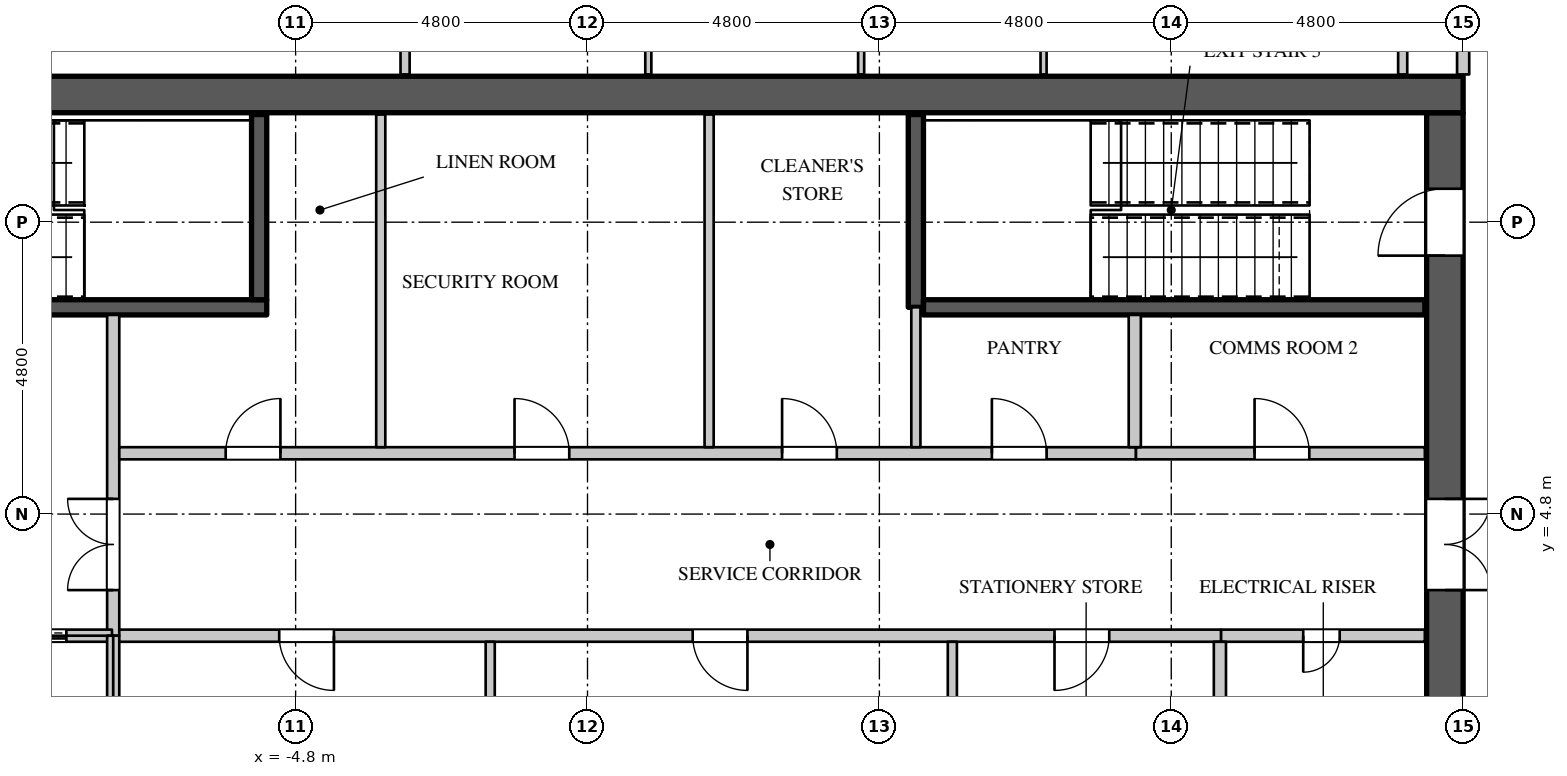
"""IFC4 building model, lengths in metres.
Left out: names, types, materials, properties, quantities, classifications, styles, units other than length and angle.
Written with IfcOpenShell. Run it as: python <this file> out.ifc"""

import sys

from ifc_helpers import new_model, si_unit, direction, frame, frame_2d, origin, place, context, subcontext, project, spatial, rectangle, extrude, element, fill, save


model = new_model("IFC4")
c1 = context("Model", 3, precision=1e-05, world=origin(), true_north=direction((0.0, 1.0)))
c2 = subcontext(c1, "Body", "Model", "MODEL_VIEW")
j1 = project(units=[si_unit("LENGTHUNIT", "METRE"), si_unit("PLANEANGLEUNIT", "RADIAN")], contexts=[c1])
p1 = place(None, origin())
s1 = spatial("IfcSite", under=j1, at=p1, CompositionType="ELEMENT")
p2 = place(p1, origin())
s2 = spatial("IfcBuilding", under=s1, at=p2, CompositionType="ELEMENT")
p3 = place(p2, frame((0.0, 0.0, 293.7)))
s3 = spatial("IfcBuildingStorey", under=s2, at=p3, CompositionType="ELEMENT", Elevation=293.7)
p4 = place(p3, frame((-14.4, 11.7, 0.0), z_axis=(0.0, 0.0, 1.0), x_axis=(1.0, 0.0, 0.0)))
e1 = element("IfcWall", 1, at=p4, inside=s3, PredefinedType="SHEAR", context=c2, shape_type="SweptSolid", body=[
    extrude(rectangle(XDim=28.8, YDim=0.6, at=frame_2d((14.4, 0.0))), origin(), (0.0, 0.0, 1.0), 4.2),
])
p5 = place(p3, frame((14.1, -11.4, 0.0), z_axis=(0.0, 0.0, 1.0), x_axis=(0.0, 1.0, 0.0)))
e2 = element("IfcWall", 2, at=p5, inside=s3, PredefinedType="SHEAR", context=c2, shape_type="SweptSolid", body=[
    extrude(rectangle(XDim=22.8, YDim=0.6, at=frame_2d((11.4, 0.0))), origin(), (0.0, 0.0, 1.0), 4.2),
])
p6 = place(p5, frame((20.45, 0.0, 0.0)))
e3 = element("IfcOpeningElement", 3, at=p6, cuts=e2, PredefinedType="OPENING", context=c2, shape_type="SweptSolid", body=[
    extrude(rectangle(XDim=1.1, YDim=2.2, at=frame_2d((0.55, 1.1))), frame((0.0, 0.31, 0.0), z_axis=(0.0, -1.0, 0.0), x_axis=(1.0, 0.0, 0.0)), (0.0, 0.0, 1.0), 0.62),
])
p7 = place(p5, frame((1.25, 0.0, 0.0)))
e4 = element("IfcOpeningElement", 4, at=p7, cuts=e2, PredefinedType="OPENING", context=c2, shape_type="SweptSolid", body=[
    extrude(rectangle(XDim=1.1, YDim=2.2, at=frame_2d((0.55, 1.1))), frame((0.0, 0.31, 0.0), z_axis=(0.0, -1.0, 0.0), x_axis=(1.0, 0.0, 0.0)), (0.0, 0.0, 1.0), 0.62),
])
p8 = place(p5, frame((14.95, 0.0, 0.0)))
e5 = element("IfcOpeningElement", 5, at=p8, cuts=e2, PredefinedType="OPENING", context=c2, shape_type="SweptSolid", body=[
    extrude(rectangle(XDim=1.5, YDim=2.4, at=frame_2d((0.75, 1.2))), frame((0.0, 0.31, 0.0), z_axis=(0.0, -1.0, 0.0), x_axis=(1.0, 0.0, 0.0)), (0.0, 0.0, 1.0), 0.62),
])
p9 = place(p5, frame((6.35, 0.0, 0.0)))
e6 = element("IfcOpeningElement", 6, at=p9, cuts=e2, PredefinedType="OPENING", context=c2, shape_type="SweptSolid", body=[
    extrude(rectangle(XDim=1.5, YDim=2.4, at=frame_2d((0.75, 1.2))), frame((0.0, 0.31, 0.0), z_axis=(0.0, -1.0, 0.0), x_axis=(1.0, 0.0, 0.0)), (0.0, 0.0, 1.0), 0.62),
])
p10 = place(p3, frame((-7.82, 2.8, 0.0), z_axis=(0.0, 0.0, 1.0), x_axis=(1.0, 0.0, 0.0)))
e7 = element("IfcWall", 7, at=p10, inside=s3, PredefinedType="PARTITIONING", context=c2, shape_type="SweptSolid", body=[
    extrude(rectangle(XDim=18.24, YDim=0.2, at=frame_2d((9.12, 0.0))), origin(), (0.0, 0.0, 1.0), 3.95),
])
p11 = place(p10, frame((2.75, 0.0, 0.0)))
e8 = element("IfcOpeningElement", 8, at=p11, cuts=e7, PredefinedType="OPENING", context=c2, shape_type="SweptSolid", body=[
    extrude(rectangle(XDim=0.9, YDim=2.2, at=frame_2d((0.45, 1.1))), frame((0.0, 0.11, 0.0), z_axis=(0.0, -1.0, 0.0), x_axis=(1.0, 0.0, 0.0)), (0.0, 0.0, 1.0), 0.22),
])
p12 = place(p10, frame((9.55, 0.0, 0.0)))
e9 = element("IfcOpeningElement", 9, at=p12, cuts=e7, PredefinedType="OPENING", context=c2, shape_type="SweptSolid", body=[
    extrude(rectangle(XDim=0.9, YDim=2.2, at=frame_2d((0.45, 1.1))), frame((0.0, 0.11, 0.0), z_axis=(0.0, -1.0, 0.0), x_axis=(1.0, 0.0, 0.0)), (0.0, 0.0, 1.0), 0.22),
])
p13 = place(p10, frame((15.5, 0.0, 0.0)))
e10 = element("IfcOpeningElement", 10, at=p13, cuts=e7, PredefinedType="OPENING", context=c2, shape_type="SweptSolid", body=[
    extrude(rectangle(XDim=0.9, YDim=2.2, at=frame_2d((0.45, 1.1))), frame((0.0, 0.11, 0.0), z_axis=(0.0, -1.0, 0.0), x_axis=(1.0, 0.0, 0.0)), (0.0, 0.0, 1.0), 0.22),
])
p14 = place(p3, frame((-7.8, 2.8, 0.0), z_axis=(0.0, 0.0, 1.0), x_axis=(0.0, 1.0, 0.0)))
e11 = element("IfcWall", 11, at=p14, inside=s3, PredefinedType="PARTITIONING", context=c2, shape_type="SweptSolid", body=[
    extrude(rectangle(XDim=5.275, YDim=0.2, at=frame_2d((2.637, 0.0))), origin(), (0.0, 0.0, 1.0), 3.95),
])
p15 = place(p14, frame((0.75, 0.0, 0.0)))
e12 = element("IfcOpeningElement", 12, at=p15, cuts=e11, PredefinedType="OPENING", context=c2, shape_type="SweptSolid", body=[
    extrude(rectangle(XDim=1.5, YDim=2.4, at=frame_2d((0.75, 1.2))), frame((0.0, 0.11, 0.0), z_axis=(0.0, -1.0, 0.0), x_axis=(1.0, 0.0, 0.0)), (0.0, 0.0, 1.0), 0.22),
])
p16 = place(p3, frame((-7.7, 5.8, 0.0), z_axis=(0.0, 0.0, 1.0), x_axis=(1.0, 0.0, 0.0)))
e13 = element("IfcWall", 13, at=p16, inside=s3, PredefinedType="PARTITIONING", context=c2, shape_type="SweptSolid", body=[
    extrude(rectangle(XDim=16.72, YDim=0.2, at=frame_2d((8.36, 0.0))), origin(), (0.0, 0.0, 1.0), 3.95),
])
p17 = place(p16, frame((1.75, 0.0, 0.0)))
e14 = element("IfcOpeningElement", 14, at=p17, cuts=e13, PredefinedType="OPENING", context=c2, shape_type="SweptSolid", body=[
    extrude(rectangle(XDim=0.9, YDim=2.2, at=frame_2d((0.45, 1.1))), frame((0.0, 0.11, 0.0), z_axis=(0.0, -1.0, 0.0), x_axis=(1.0, 0.0, 0.0)), (0.0, 0.0, 1.0), 0.22),
])
p18 = place(p16, frame((6.5, 0.0, 0.0)))
e15 = element("IfcOpeningElement", 15, at=p18, cuts=e13, PredefinedType="OPENING", context=c2, shape_type="SweptSolid", body=[
    extrude(rectangle(XDim=0.9, YDim=2.2, at=frame_2d((0.45, 1.1))), frame((0.0, 0.11, 0.0), z_axis=(0.0, -1.0, 0.0), x_axis=(1.0, 0.0, 0.0)), (0.0, 0.0, 1.0), 0.22),
])
p19 = place(p16, frame((10.9, 0.0, 0.0)))
e16 = element("IfcOpeningElement", 16, at=p19, cuts=e13, PredefinedType="OPENING", context=c2, shape_type="SweptSolid", body=[
    extrude(rectangle(XDim=0.9, YDim=2.2, at=frame_2d((0.45, 1.1))), frame((0.0, 0.11, 0.0), z_axis=(0.0, -1.0, 0.0), x_axis=(1.0, 0.0, 0.0)), (0.0, 0.0, 1.0), 0.22),
])
p20 = place(p16, frame((14.35, 0.0, 0.0)))
e17 = element("IfcOpeningElement", 17, at=p20, cuts=e13, PredefinedType="OPENING", context=c2, shape_type="SweptSolid", body=[
    extrude(rectangle(XDim=0.9, YDim=2.2, at=frame_2d((0.45, 1.1))), frame((0.0, 0.11, 0.0), z_axis=(0.0, -1.0, 0.0), x_axis=(1.0, 0.0, 0.0)), (0.0, 0.0, 1.0), 0.22),
])
p21 = place(p3, frame((14.4, 12.03, 0.0), z_axis=(0.0, 0.0, 1.0), x_axis=(0.0, 1.0, 0.0)))
e18 = element("IfcWall", 18, at=p21, inside=s3, PredefinedType="PARTITIONING", context=c2, shape_type="SweptSolid", body=[
    extrude(rectangle(XDim=2.27, YDim=0.2, at=frame_2d((1.135, 0.0))), origin(), (0.0, 0.0, 1.0), 3.95),
])
p22 = place(p3, frame((-3.4, 5.9, 0.0), z_axis=(0.0, 0.0, 1.0), x_axis=(0.0, 1.0, 0.0)))
e19 = element("IfcWall", 19, at=p22, inside=s3, PredefinedType="PARTITIONING", context=c2, shape_type="SweptSolid", body=[
    extrude(rectangle(XDim=5.47, YDim=0.15, at=frame_2d((2.735, 0.0))), origin(), (0.0, 0.0, 1.0), 3.95),
])
p23 = place(p3, frame((-3.0, 12.03, 0.0), z_axis=(0.0, 0.0, 1.0), x_axis=(0.0, 1.0, 0.0)))
e20 = element("IfcWall", 20, at=p23, inside=s3, PredefinedType="PARTITIONING", context=c2, shape_type="SweptSolid", body=[
    extrude(rectangle(XDim=6.795, YDim=0.15, at=frame_2d((3.397, 0.0))), origin(), (0.0, 0.0, 1.0), 3.95),
])
p24 = place(p23, frame((2.95, 0.0, 0.0)))
e21 = element("IfcOpeningElement", 21, at=p24, cuts=e20, PredefinedType="OPENING", context=c2, shape_type="SweptSolid", body=[
    extrude(rectangle(XDim=0.9, YDim=2.2, at=frame_2d((0.45, 1.1))), frame((0.0, 0.085, 0.0), z_axis=(0.0, -1.0, 0.0), x_axis=(1.0, 0.0, 0.0)), (0.0, 0.0, 1.0), 0.17),
])
p25 = place(p3, frame((-1.6, 0.1, 0.0), z_axis=(0.0, 0.0, 1.0), x_axis=(0.0, 1.0, 0.0)))
e22 = element("IfcWall", 22, at=p25, inside=s3, PredefinedType="PARTITIONING", context=c2, shape_type="SweptSolid", body=[
    extrude(rectangle(XDim=2.6, YDim=0.15, at=frame_2d((1.3, 0.0))), origin(), (0.0, 0.0, 1.0), 3.95),
])
p26 = place(p3, frame((2.0, 5.9, 0.0), z_axis=(0.0, 0.0, 1.0), x_axis=(0.0, 1.0, 0.0)))
e23 = element("IfcWall", 23, at=p26, inside=s3, PredefinedType="PARTITIONING", context=c2, shape_type="SweptSolid", body=[
    extrude(rectangle(XDim=5.47, YDim=0.15, at=frame_2d((2.735, 0.0))), origin(), (0.0, 0.0, 1.0), 3.95),
])
p27 = place(p3, frame((5.4, 5.9, 0.0), z_axis=(0.0, 0.0, 1.0), x_axis=(0.0, 1.0, 0.0)))
e24 = element("IfcWall", 24, at=p27, inside=s3, PredefinedType="PARTITIONING", context=c2, shape_type="SweptSolid", body=[
    extrude(rectangle(XDim=2.3, YDim=0.15, at=frame_2d((1.15, 0.0))), origin(), (0.0, 0.0, 1.0), 3.95),
])
p28 = place(p3, frame((6.0, 0.1, 0.0), z_axis=(0.0, 0.0, 1.0), x_axis=(0.0, 1.0, 0.0)))
e25 = element("IfcWall", 25, at=p28, inside=s3, PredefinedType="PARTITIONING", context=c2, shape_type="SweptSolid", body=[
    extrude(rectangle(XDim=2.6, YDim=0.15, at=frame_2d((1.3, 0.0))), origin(), (0.0, 0.0, 1.0), 3.95),
])
p29 = place(p3, frame((13.406, 12.03, 0.0), z_axis=(0.0, 0.0, 1.0), x_axis=(0.0, 1.0, 0.0)))
e26 = element("IfcWall", 26, at=p29, inside=s3, PredefinedType="PARTITIONING", context=c2, shape_type="SweptSolid", body=[
    extrude(rectangle(XDim=13.701, YDim=0.15, at=frame_2d((6.851, 0.0))), origin(), (0.0, 0.0, 1.0), 3.3),
])
p30 = place(p29, frame((2.5, 0.0, 0.0)))
e27 = element("IfcOpeningElement", 27, at=p30, cuts=e26, PredefinedType="OPENING", context=c2, shape_type="SweptSolid", body=[
    extrude(rectangle(XDim=1.5, YDim=2.2, at=frame_2d((0.75, 1.1))), frame((0.0, 0.085, 0.0), z_axis=(0.0, -1.0, 0.0), x_axis=(1.0, 0.0, 0.0)), (0.0, 0.0, 1.0), 0.17),
])
p31 = place(p3, frame((9.02, 5.8, 0.0), z_axis=(0.0, 0.0, 1.0), x_axis=(1.0, 0.0, 0.0)))
e28 = element("IfcWall", 28, at=p31, inside=s3, PredefinedType="PARTITIONING", context=c2, shape_type="SweptSolid", body=[
    extrude(rectangle(XDim=4.75, YDim=0.2, at=frame_2d((2.375, 0.0))), origin(), (0.0, 0.0, 1.0), 3.95),
])
p32 = place(p31, frame((1.95, 0.0, 0.0)))
e29 = element("IfcOpeningElement", 29, at=p32, cuts=e28, PredefinedType="OPENING", context=c2, shape_type="SweptSolid", body=[
    extrude(rectangle(XDim=0.9, YDim=2.2, at=frame_2d((0.45, 1.1))), frame((0.0, 0.11, 0.0), z_axis=(0.0, -1.0, 0.0), x_axis=(1.0, 0.0, 0.0)), (0.0, 0.0, 1.0), 0.22),
])
p33 = place(p3, frame((9.0, 5.9, 0.0), z_axis=(0.0, 0.0, 1.0), x_axis=(0.0, 1.0, 0.0)))
e30 = element("IfcWall", 30, at=p33, inside=s3, PredefinedType="PARTITIONING", context=c2, shape_type="SweptSolid", body=[
    extrude(rectangle(XDim=2.175, YDim=0.2, at=frame_2d((1.087, 0.0))), origin(), (0.0, 0.0, 1.0), 3.95),
])
p34 = place(p3, frame((10.42, 2.8, 0.0), z_axis=(0.0, 0.0, 1.0), x_axis=(1.0, 0.0, 0.0)))
e31 = element("IfcWall", 31, at=p34, inside=s3, PredefinedType="PARTITIONING", context=c2, shape_type="SweptSolid", body=[
    extrude(rectangle(XDim=3.35, YDim=0.2, at=frame_2d((1.675, 0.0))), origin(), (0.0, 0.0, 1.0), 3.95),
])
p35 = place(p34, frame((1.35, 0.0, 0.0)))
e32 = element("IfcOpeningElement", 32, at=p35, cuts=e31, PredefinedType="OPENING", context=c2, shape_type="SweptSolid", body=[
    extrude(rectangle(XDim=0.6, YDim=2.0, at=frame_2d((0.3, 1.0))), frame((0.0, 0.11, 0.0), z_axis=(0.0, -1.0, 0.0), x_axis=(1.0, 0.0, 0.0)), (0.0, 0.0, 1.0), 0.22),
])
p36 = place(p3, frame((10.4, 0.1, 0.0), z_axis=(0.0, 0.0, 1.0), x_axis=(0.0, 1.0, 0.0)))
e33 = element("IfcWall", 33, at=p36, inside=s3, PredefinedType="PARTITIONING", context=c2, shape_type="SweptSolid", body=[
    extrude(rectangle(XDim=2.6, YDim=0.2, at=frame_2d((1.3, 0.0))), origin(), (0.0, 0.0, 1.0), 3.95),
])
p37 = place(p3, frame((-13.77, 2.8, 0.0), z_axis=(0.0, 0.0, 1.0), x_axis=(1.0, 0.0, 0.0)))
e34 = element("IfcWall", 34, at=p37, inside=s3, PredefinedType="PARTITIONING", context=c2, shape_type="SweptSolid", body=[
    extrude(rectangle(XDim=5.95, YDim=0.2, at=frame_2d((2.975, 0.0))), origin(), (0.0, 0.0, 1.0), 3.95),
])
p38 = place(p37, frame((1.1, 0.0, 0.0)))
e35 = element("IfcOpeningElement", 35, at=p38, cuts=e34, PredefinedType="OPENING", context=c2, shape_type="SweptSolid", body=[
    extrude(rectangle(XDim=1.1, YDim=2.2, at=frame_2d((0.55, 1.1))), frame((0.0, 0.11, 0.0), z_axis=(0.0, -1.0, 0.0), x_axis=(1.0, 0.0, 0.0)), (0.0, 0.0, 1.0), 0.22),
])
p39 = place(p37, frame((4.1, 0.0, 0.0)))
e36 = element("IfcOpeningElement", 36, at=p39, cuts=e34, PredefinedType="OPENING", context=c2, shape_type="SweptSolid", body=[
    extrude(rectangle(XDim=1.1, YDim=2.2, at=frame_2d((0.55, 1.1))), frame((0.0, 0.11, 0.0), z_axis=(0.0, -1.0, 0.0), x_axis=(1.0, 0.0, 0.0)), (0.0, 0.0, 1.0), 0.22),
])
p40 = place(p3, frame((-7.8, 0.0, 0.0), z_axis=(0.0, 0.0, 1.0), x_axis=(0.0, 1.0, 0.0)))
e37 = element("IfcWall", 37, at=p40, inside=s3, PredefinedType="PARTITIONING", context=c2, shape_type="SweptSolid", body=[
    extrude(rectangle(XDim=2.8, YDim=0.2, at=frame_2d((1.4, 0.0))), origin(), (0.0, 0.0, 1.0), 3.95),
])
p41 = place(p3, frame((-13.77, 8.2, 0.0), z_axis=(0.0, 0.0, 1.0), x_axis=(1.0, 0.0, 0.0)))
e38 = element("IfcWall", 38, at=p41, inside=s3, PredefinedType="SHEAR", context=c2, shape_type="SweptSolid", body=[
    extrude(rectangle(XDim=8.495, YDim=0.25, at=frame_2d((4.248, 0.0))), origin(), (0.0, 0.0, 1.0), 3.95),
])
p42 = place(p41, frame((0.15, 0.0, 0.0)))
e39 = element("IfcOpeningElement", 39, at=p42, cuts=e38, PredefinedType="OPENING", context=c2, shape_type="SweptSolid", body=[
    extrude(rectangle(XDim=1.1, YDim=2.2, at=frame_2d((0.55, 1.1))), frame((0.0, 0.135, 0.0), z_axis=(0.0, -1.0, 0.0), x_axis=(1.0, 0.0, 0.0)), (0.0, 0.0, 1.0), 0.27),
])
p43 = place(p3, frame((-5.4, 8.325, 0.0), z_axis=(0.0, 0.0, 1.0), x_axis=(0.0, 1.0, 0.0)))
e40 = element("IfcWall", 40, at=p43, inside=s3, PredefinedType="SHEAR", context=c2, shape_type="SweptSolid", body=[
    extrude(rectangle(XDim=3.045, YDim=0.25, at=frame_2d((1.522, 0.0))), origin(), (0.0, 0.0, 1.0), 3.95),
])
p44 = place(p3, frame((5.4, 8.2, 0.0), z_axis=(0.0, 0.0, 1.0), x_axis=(0.0, 1.0, 0.0)))
e41 = element("IfcWall", 41, at=p44, inside=s3, PredefinedType="SHEAR", context=c2, shape_type="SweptSolid", body=[
    extrude(rectangle(XDim=3.17, YDim=0.25, at=frame_2d((1.585, 0.0))), origin(), (0.0, 0.0, 1.0), 3.95),
])
p45 = place(p3, frame((5.525, 8.2, 0.0), z_axis=(0.0, 0.0, 1.0), x_axis=(1.0, 0.0, 0.0)))
e42 = element("IfcWall", 42, at=p45, inside=s3, PredefinedType="SHEAR", context=c2, shape_type="SweptSolid", body=[
    extrude(rectangle(XDim=8.245, YDim=0.25, at=frame_2d((4.123, 0.0))), origin(), (0.0, 0.0, 1.0), 3.95),
])
p46 = place(p3, frame((1.0, 12.03, 0.0), z_axis=(0.0, 0.0, 1.0), x_axis=(0.0, 1.0, 0.0)))
e43 = element("IfcWall", 43, at=p46, inside=s3, PredefinedType="PARTITIONING", context=c2, shape_type="SweptSolid", body=[
    extrude(rectangle(XDim=6.82, YDim=0.1, at=frame_2d((3.41, 0.0))), origin(), (0.0, 0.0, 1.0), 3.95),
])
p47 = place(p3, frame((4.5, 12.03, 0.0), z_axis=(0.0, 0.0, 1.0), x_axis=(0.0, 1.0, 0.0)))
e44 = element("IfcWall", 44, at=p47, inside=s3, PredefinedType="PARTITIONING", context=c2, shape_type="SweptSolid", body=[
    extrude(rectangle(XDim=5.87, YDim=0.1, at=frame_2d((2.935, 0.0))), origin(), (0.0, 0.0, 1.0), 3.3),
])
p48 = place(p3, frame((7.5, 12.03, 0.0), z_axis=(0.0, 0.0, 1.0), x_axis=(0.0, 1.0, 0.0)))
e45 = element("IfcWall", 45, at=p48, inside=s3, PredefinedType="PARTITIONING", context=c2, shape_type="SweptSolid", body=[
    extrude(rectangle(XDim=5.845, YDim=0.1, at=frame_2d((2.922, 0.0))), origin(), (0.0, 0.0, 1.0), 3.95),
])
p49 = place(p48, frame((2.45, 0.0, 0.0)))
e46 = element("IfcOpeningElement", 46, at=p49, cuts=e45, PredefinedType="OPENING", context=c2, shape_type="SweptSolid", body=[
    extrude(rectangle(XDim=0.9, YDim=2.2, at=frame_2d((0.45, 1.1))), frame((0.0, 0.06, 0.0), z_axis=(0.0, -1.0, 0.0), x_axis=(1.0, 0.0, 0.0)), (0.0, 0.0, 1.0), 0.12),
])
p50 = place(p35, origin())
e47 = element("IfcDoor", 47, at=p50, inside=s3, OperationType="SINGLE_SWING_RIGHT", PredefinedType="DOOR", context=c2, shape_type="SweptSolid", body=[
    extrude(rectangle(XDim=0.6, YDim=2.0, at=frame_2d((0.3, 1.0))), frame((0.0, 0.025, 0.0), z_axis=(0.0, -1.0, 0.0), x_axis=(1.0, 0.0, 0.0)), (0.0, 0.0, 1.0), 0.05),
])
fill(e32, e47)
p51 = place(p17, origin())
e48 = element("IfcDoor", 48, at=p51, inside=s3, OperationType="SINGLE_SWING_RIGHT", PredefinedType="DOOR", context=c2, shape_type="SweptSolid", body=[
    extrude(rectangle(XDim=0.9, YDim=2.2, at=frame_2d((0.45, 1.1))), frame((0.0, 0.025, 0.0), z_axis=(0.0, -1.0, 0.0), x_axis=(1.0, 0.0, 0.0)), (0.0, 0.0, 1.0), 0.05),
])
fill(e14, e48)
p52 = place(p18, origin())
e49 = element("IfcDoor", 49, at=p52, inside=s3, OperationType="SINGLE_SWING_LEFT", PredefinedType="DOOR", context=c2, shape_type="SweptSolid", body=[
    extrude(rectangle(XDim=0.9, YDim=2.2, at=frame_2d((0.45, 1.1))), frame((0.0, 0.025, 0.0), z_axis=(0.0, -1.0, 0.0), x_axis=(1.0, 0.0, 0.0)), (0.0, 0.0, 1.0), 0.05),
])
fill(e15, e49)
p53 = place(p19, origin())
e50 = element("IfcDoor", 50, at=p53, inside=s3, OperationType="SINGLE_SWING_LEFT", PredefinedType="DOOR", context=c2, shape_type="SweptSolid", body=[
    extrude(rectangle(XDim=0.9, YDim=2.2, at=frame_2d((0.45, 1.1))), frame((0.0, 0.025, 0.0), z_axis=(0.0, -1.0, 0.0), x_axis=(1.0, 0.0, 0.0)), (0.0, 0.0, 1.0), 0.05),
])
fill(e16, e50)
p54 = place(p20, origin())
e51 = element("IfcDoor", 51, at=p54, inside=s3, OperationType="SINGLE_SWING_LEFT", PredefinedType="DOOR", context=c2, shape_type="SweptSolid", body=[
    extrude(rectangle(XDim=0.9, YDim=2.2, at=frame_2d((0.45, 1.1))), frame((0.0, 0.025, 0.0), z_axis=(0.0, -1.0, 0.0), x_axis=(1.0, 0.0, 0.0)), (0.0, 0.0, 1.0), 0.05),
])
fill(e17, e51)
p55 = place(p32, origin())
e52 = element("IfcDoor", 52, at=p55, inside=s3, OperationType="SINGLE_SWING_LEFT", PredefinedType="DOOR", context=c2, shape_type="SweptSolid", body=[
    extrude(rectangle(XDim=0.9, YDim=2.2, at=frame_2d((0.45, 1.1))), frame((0.0, 0.025, 0.0), z_axis=(0.0, -1.0, 0.0), x_axis=(1.0, 0.0, 0.0)), (0.0, 0.0, 1.0), 0.05),
])
fill(e29, e52)
p56 = place(p11, origin())
e53 = element("IfcDoor", 53, at=p56, inside=s3, OperationType="SINGLE_SWING_LEFT", PredefinedType="DOOR", context=c2, shape_type="SweptSolid", body=[
    extrude(rectangle(XDim=0.9, YDim=2.2, at=frame_2d((0.45, 1.1))), frame((0.0, 0.025, 0.0), z_axis=(0.0, -1.0, 0.0), x_axis=(1.0, 0.0, 0.0)), (0.0, 0.0, 1.0), 0.05),
])
fill(e8, e53)
p57 = place(p12, origin())
e54 = element("IfcDoor", 54, at=p57, inside=s3, OperationType="SINGLE_SWING_LEFT", PredefinedType="DOOR", context=c2, shape_type="SweptSolid", body=[
    extrude(rectangle(XDim=0.9, YDim=2.2, at=frame_2d((0.45, 1.1))), frame((0.0, 0.025, 0.0), z_axis=(0.0, -1.0, 0.0), x_axis=(1.0, 0.0, 0.0)), (0.0, 0.0, 1.0), 0.05),
])
fill(e9, e54)
p58 = place(p13, origin())
e55 = element("IfcDoor", 55, at=p58, inside=s3, OperationType="SINGLE_SWING_RIGHT", PredefinedType="DOOR", context=c2, shape_type="SweptSolid", body=[
    extrude(rectangle(XDim=0.9, YDim=2.2, at=frame_2d((0.45, 1.1))), frame((0.0, 0.025, 0.0), z_axis=(0.0, -1.0, 0.0), x_axis=(1.0, 0.0, 0.0)), (0.0, 0.0, 1.0), 0.05),
])
fill(e10, e55)
p59 = place(p39, origin())
e56 = element("IfcDoor", 56, at=p59, inside=s3, OperationType="DOUBLE_DOOR_SLIDING", PredefinedType="DOOR", context=c2, shape_type="SweptSolid", body=[
    extrude(rectangle(XDim=1.1, YDim=2.2, at=frame_2d((0.55, 1.1))), frame((0.0, 0.025, 0.0), z_axis=(0.0, -1.0, 0.0), x_axis=(1.0, 0.0, 0.0)), (0.0, 0.0, 1.0), 0.05),
])
fill(e36, e56)
p60 = place(p15, origin())
e57 = element("IfcDoor", 57, at=p60, inside=s3, OperationType="DOUBLE_DOOR_SINGLE_SWING", PredefinedType="DOOR", context=c2, shape_type="SweptSolid", body=[
    extrude(rectangle(XDim=1.5, YDim=2.4, at=frame_2d((0.75, 1.2))), frame((0.0, 0.025, 0.0), z_axis=(0.0, -1.0, 0.0), x_axis=(1.0, 0.0, 0.0)), (0.0, 0.0, 1.0), 0.05),
])
fill(e12, e57)
p61 = place(p6, origin())
e58 = element("IfcDoor", 58, at=p61, inside=s3, OperationType="SINGLE_SWING_LEFT", PredefinedType="DOOR", context=c2, shape_type="SweptSolid", body=[
    extrude(rectangle(XDim=1.1, YDim=2.2, at=frame_2d((0.55, 1.1))), frame((0.0, 0.295, 0.0), z_axis=(0.0, -1.0, 0.0), x_axis=(1.0, 0.0, 0.0)), (0.0, 0.0, 1.0), 0.05),
])
fill(e3, e58)
p62 = place(p8, origin())
e59 = element("IfcDoor", 59, at=p62, inside=s3, OperationType="DOUBLE_DOOR_SINGLE_SWING", PredefinedType="DOOR", context=c2, shape_type="SweptSolid", body=[
    extrude(rectangle(XDim=1.5, YDim=2.4, at=frame_2d((0.75, 1.2))), frame((0.0, -0.245, 0.0), z_axis=(0.0, -1.0, 0.0), x_axis=(1.0, 0.0, 0.0)), (0.0, 0.0, 1.0), 0.05),
])
fill(e5, e59)
save(model, sys.argv[1])
